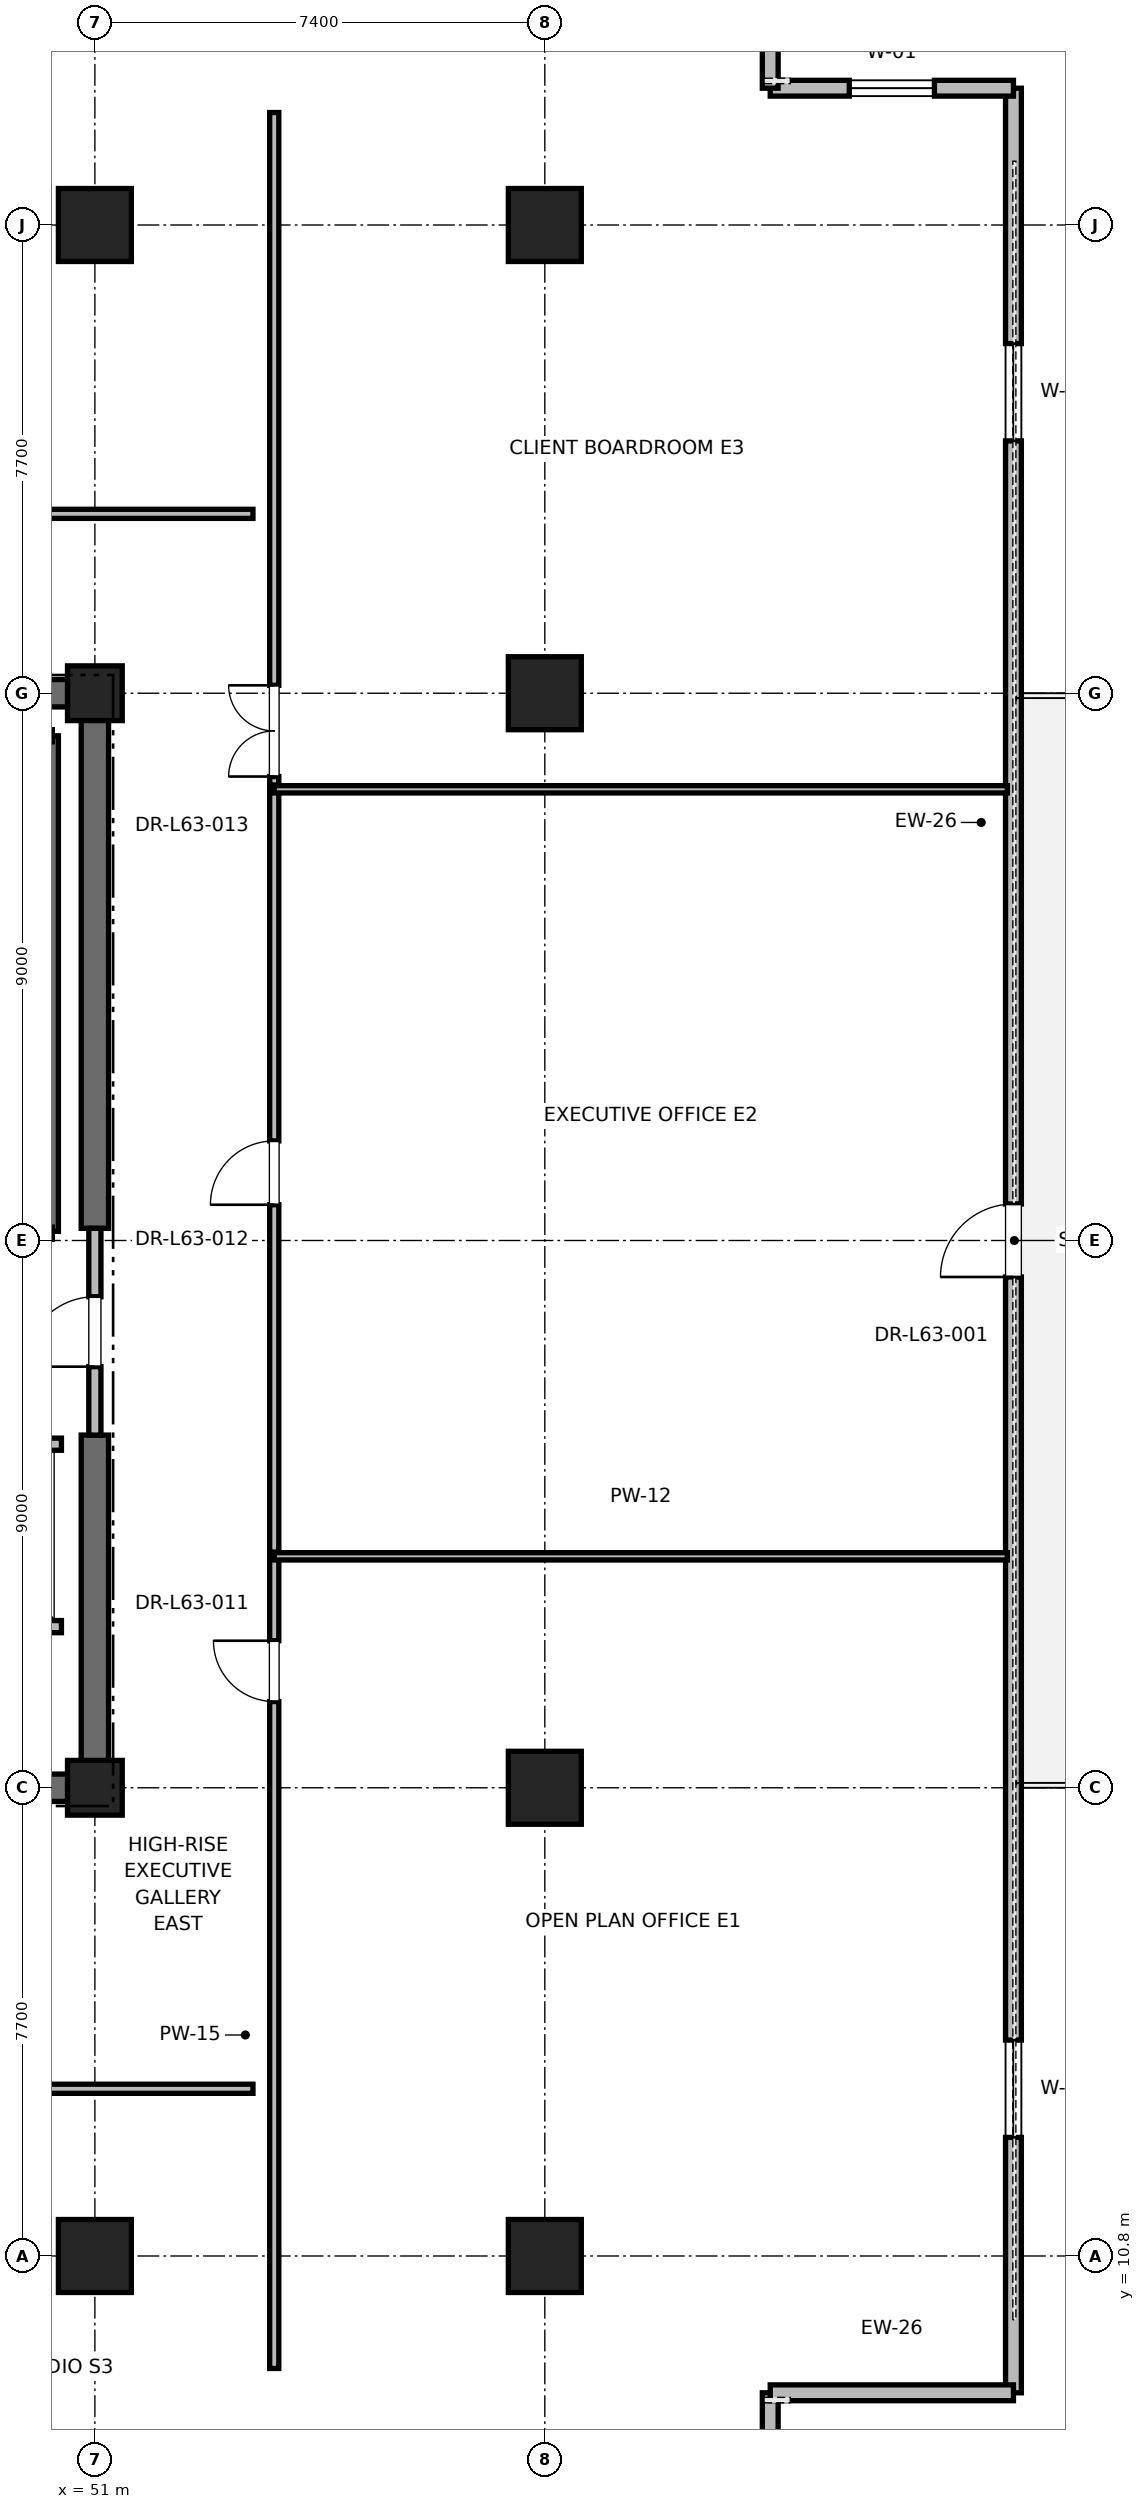
"""IFC4 building model, lengths in metres.
Left out: names, types, materials, properties, quantities, classifications, styles, units other than length and angle.
Written with IfcOpenShell. Run it as: python <this file> out.ifc"""

import sys

from ifc_helpers import new_model, si_unit, direction, frame, frame_2d, origin, origin_2d, place, context, subcontext, project, spatial, rectangle, extrude, element, fill, save


model = new_model("IFC4")
c1 = context("Model", 3, precision=1e-05, world=origin(), true_north=direction((0.0, 1.0)))
c2 = subcontext(c1, "Body", "Model", "MODEL_VIEW")
j1 = project(units=[si_unit("LENGTHUNIT", "METRE"), si_unit("PLANEANGLEUNIT", "RADIAN")], contexts=[c1])
p1 = place(None, origin())
s1 = spatial("IfcSite", under=j1, at=p1, CompositionType="ELEMENT")
p2 = place(p1, origin())
s2 = spatial("IfcBuilding", under=s1, at=p2, CompositionType="ELEMENT")
p3 = place(p2, frame((0.0, 0.0, 271.2)))
s3 = spatial("IfcBuildingStorey", under=s2, at=p3, CompositionType="ELEMENT", Elevation=271.2)
for number, where, z_axis, x_axis in (
    (1, (51.0, 10.8, 0.0), (0.0, 0.0, 1.0), (1.0, 0.0, 0.0)),
    (2, (51.0, 44.2, 0.0), (0.0, 0.0, 1.0), (1.0, 0.0, 0.0)),
    (3, (58.4, 18.5, 0.0), (0.0, 0.0, 1.0), (1.0, 0.0, 0.0)),
    (4, (58.4, 36.5, 0.0), (0.0, 0.0, 1.0), (1.0, 0.0, 0.0)),
    (5, (58.4, 10.8, 0.0), (0.0, 0.0, 1.0), (1.0, 0.0, 0.0)),
    (6, (58.4, 44.2, 0.0), (0.0, 0.0, 1.0), (1.0, 0.0, 0.0)),
):
    element("IfcColumn", number, at=place(p3, frame(where, z_axis=z_axis, x_axis=x_axis)), inside=s3, PredefinedType="COLUMN", context=c2, shape_type="SweptSolid", body=[
        extrude(rectangle(XDim=1.2, YDim=1.2, at=origin_2d()), origin(), (0.0, 0.0, 1.0), 4.0),
    ])
for number, where, z_axis, x_axis in (
    (7, (51.0, 18.5, 0.0), (0.0, 0.0, 1.0), (1.0, 0.0, 0.0)),
    (8, (51.0, 36.5, 0.0), (0.0, 0.0, 1.0), (1.0, 0.0, 0.0)),
):
    element("IfcColumn", number, at=place(p3, frame(where, z_axis=z_axis, x_axis=x_axis)), inside=s3, PredefinedType="PILASTER", context=c2, shape_type="SweptSolid", body=[
        extrude(rectangle(XDim=0.9, YDim=0.9, at=origin_2d()), origin(), (0.0, 0.0, 1.0), 4.0),
    ])
p4 = place(p3, frame((41.8, 18.5, 0.0), z_axis=(0.0, 0.0, 1.0), x_axis=(1.0, 0.0, 0.0)))
e9 = element("IfcWall", 9, at=p4, inside=s3, PredefinedType="SHEAR", context=c2, shape_type="SweptSolid", body=[
    extrude(rectangle(XDim=9.2, YDim=0.45, at=frame_2d((4.6, 0.0))), origin(), (0.0, 0.0, 1.0), 3.785),
])
for number, where, z_axis, x_axis in (
    (10, (45.2, 36.5, 0.0), (0.0, 0.0, 1.0), (1.0, 0.0, 0.0)),
    (11, (51.0, 18.5, 0.0), (0.0, 0.0, 1.0), (0.0, 1.0, 0.0)),
):
    element("IfcWall", number, at=place(p3, frame(where, z_axis=z_axis, x_axis=x_axis)), inside=s3, PredefinedType="SHEAR", context=c2, shape_type="SweptSolid", body=[
        extrude(rectangle(XDim=5.8, YDim=0.45, at=frame_2d((2.9, 0.0))), origin(), (0.0, 0.0, 1.0), 3.785),
    ])
p5 = place(p3, frame((51.0, 27.7, 0.0), z_axis=(0.0, 0.0, 1.0), x_axis=(0.0, 1.0, 0.0)))
e12 = element("IfcWall", 12, at=p5, inside=s3, PredefinedType="SHEAR", context=c2, shape_type="SweptSolid", body=[
    extrude(rectangle(XDim=8.8, YDim=0.45, at=frame_2d((4.4, 0.0))), origin(), (0.0, 0.0, 1.0), 3.785),
])
p6 = place(p3, frame((66.107, 8.55, 0.0), z_axis=(0.0, 0.0, 1.0), x_axis=(0.0, 1.0, 0.0)))
e13 = element("IfcWall", 13, at=p6, inside=s3, PredefinedType="PARAPET", context=c2, shape_type="SweptSolid", body=[
    extrude(rectangle(XDim=37.899, YDim=0.26, at=frame_2d((18.95, 0.0))), origin(), (0.0, 0.0, 1.0), 3.123),
])
p7 = place(p6, frame((4.2, 0.0, 0.85)))
e14 = element("IfcOpeningElement", 14, at=p7, cuts=e13, PredefinedType="OPENING", context=c2, shape_type="SweptSolid", body=[
    extrude(rectangle(XDim=1.6, YDim=2.1, at=frame_2d((0.8, 1.05))), frame((0.0, 0.13, 0.0), z_axis=(0.0, -1.0, 0.0), x_axis=(1.0, 0.0, 0.0)), (0.0, 0.0, 1.0), 0.26),
])
p8 = place(p6, frame((18.35, 0.0, 0.0)))
e15 = element("IfcOpeningElement", 15, at=p8, cuts=e13, PredefinedType="OPENING", context=c2, shape_type="SweptSolid", body=[
    extrude(rectangle(XDim=1.2, YDim=2.2, at=frame_2d((0.6, 1.1))), frame((0.0, 0.13, 0.0), z_axis=(0.0, -1.0, 0.0), x_axis=(1.0, 0.0, 0.0)), (0.0, 0.0, 1.0), 0.26),
])
p9 = place(p6, frame((32.099, 0.0, 0.85)))
e16 = element("IfcOpeningElement", 16, at=p9, cuts=e13, PredefinedType="OPENING", context=c2, shape_type="SweptSolid", body=[
    extrude(rectangle(XDim=1.6, YDim=2.1, at=frame_2d((0.8, 1.05))), frame((0.0, 0.13, 0.0), z_axis=(0.0, -1.0, 0.0), x_axis=(1.0, 0.0, 0.0)), (0.0, 0.0, 1.0), 0.26),
])
p10 = place(p3, frame((62.107, 5.05, 0.0), z_axis=(0.0, 0.0, 1.0), x_axis=(0.0, 1.0, 0.0)))
e17 = element("IfcWall", 17, at=p10, inside=s3, PredefinedType="PARAPET", context=c2, shape_type="SweptSolid", body=[
    extrude(rectangle(XDim=3.5, YDim=0.26, at=frame_2d((1.75, 0.0))), origin(), (0.0, 0.0, 1.0), 3.785),
])
p11 = place(p10, frame((1.05, 0.0, 0.85)))
e18 = element("IfcOpeningElement", 18, at=p11, cuts=e17, PredefinedType="OPENING", context=c2, shape_type="SweptSolid", body=[
    extrude(rectangle(XDim=1.4, YDim=2.0, at=frame_2d((0.7, 1.0))), frame((0.0, 0.13, 0.0), z_axis=(0.0, -1.0, 0.0), x_axis=(1.0, 0.0, 0.0)), (0.0, 0.0, 1.0), 0.26),
])
p12 = place(p3, frame((62.107, 8.55, 0.0), z_axis=(0.0, 0.0, 1.0), x_axis=(1.0, 0.0, 0.0)))
e19 = element("IfcWall", 19, at=p12, inside=s3, PredefinedType="PARAPET", context=c2, shape_type="SweptSolid", body=[
    extrude(rectangle(XDim=4.0, YDim=0.26, at=frame_2d((2.0, 0.0))), origin(), (0.0, 0.0, 1.0), 3.785),
])
p13 = place(p3, frame((66.107, 46.45, 0.0), z_axis=(0.0, 0.0, 1.0), x_axis=(-1.0, 0.0, 0.0)))
e20 = element("IfcWall", 20, at=p13, inside=s3, PredefinedType="PARAPET", context=c2, shape_type="SweptSolid", body=[
    extrude(rectangle(XDim=4.0, YDim=0.26, at=frame_2d((2.0, 0.0))), origin(), (0.0, 0.0, 1.0), 3.785),
])
p14 = place(p13, frame((1.3, 0.0, 0.85)))
e21 = element("IfcOpeningElement", 21, at=p14, cuts=e20, PredefinedType="OPENING", context=c2, shape_type="SweptSolid", body=[
    extrude(rectangle(XDim=1.4, YDim=2.0, at=frame_2d((0.7, 1.0))), frame((0.0, 0.13, 0.0), z_axis=(0.0, -1.0, 0.0), x_axis=(1.0, 0.0, 0.0)), (0.0, 0.0, 1.0), 0.26),
])
p15 = place(p3, frame((62.107, 46.45, 0.0), z_axis=(0.0, 0.0, 1.0), x_axis=(0.0, 1.0, 0.0)))
e22 = element("IfcWall", 22, at=p15, inside=s3, PredefinedType="PARAPET", context=c2, shape_type="SweptSolid", body=[
    extrude(rectangle(XDim=3.5, YDim=0.26, at=frame_2d((1.75, 0.0))), origin(), (0.0, 0.0, 1.0), 3.785),
])
p16 = place(p3, frame((50.3, 27.65, 0.0), z_axis=(0.0, 0.0, 1.0), x_axis=(0.0, 1.0, 0.0)))
e23 = element("IfcWall", 23, at=p16, inside=s3, PredefinedType="SOLIDWALL", context=c2, shape_type="SweptSolid", body=[
    extrude(rectangle(XDim=8.15, YDim=0.2, at=frame_2d((4.075, 0.0))), origin(), (0.0, 0.0, 1.0), 3.785),
])
p17 = place(p3, frame((51.0, 24.3, 0.0), z_axis=(0.0, 0.0, 1.0), x_axis=(0.0, 1.0, 0.0)))
e24 = element("IfcWall", 24, at=p17, inside=s3, PredefinedType="PARTITIONING", context=c2, shape_type="SweptSolid", body=[
    extrude(rectangle(XDim=3.4, YDim=0.2, at=frame_2d((1.7, 0.0))), origin(), (0.0, 0.0, 1.0), 2.865),
])
p18 = place(p17, frame((1.125, 0.0, 0.0)))
e25 = element("IfcOpeningElement", 25, at=p18, cuts=e24, PredefinedType="OPENING", context=c2, shape_type="SweptSolid", body=[
    extrude(rectangle(XDim=1.15, YDim=2.2, at=frame_2d((0.575, 1.1))), frame((0.0, 0.1, 0.0), z_axis=(0.0, -1.0, 0.0), x_axis=(1.0, 0.0, 0.0)), (0.0, 0.0, 1.0), 0.2),
])
p19 = place(p3, frame((47.85, 21.15, 0.0), z_axis=(0.0, 0.0, 1.0), x_axis=(1.0, 0.0, 0.0)))
e26 = element("IfcWall", 26, at=p19, inside=s3, PredefinedType="SOLIDWALL", context=c2, shape_type="SweptSolid", body=[
    extrude(rectangle(XDim=2.6, YDim=0.2, at=frame_2d((1.3, 0.0))), origin(), (0.0, 0.0, 1.0), 3.785),
])
p20 = place(p3, frame((50.45, 24.15, 0.0), z_axis=(0.0, 0.0, 1.0), x_axis=(-1.0, 0.0, 0.0)))
e27 = element("IfcWall", 27, at=p20, inside=s3, PredefinedType="SOLIDWALL", context=c2, shape_type="SweptSolid", body=[
    extrude(rectangle(XDim=2.6, YDim=0.2, at=frame_2d((1.3, 0.0))), origin(), (0.0, 0.0, 1.0), 2.865),
])
p21 = place(p20, frame((0.75, 0.0, 0.0)))
e28 = element("IfcOpeningElement", 28, at=p21, cuts=e27, PredefinedType="OPENING", context=c2, shape_type="SweptSolid", body=[
    extrude(rectangle(XDim=1.1, YDim=2.2, at=frame_2d((0.55, 1.1))), frame((0.0, 0.1, 0.0), z_axis=(0.0, -1.0, 0.0), x_axis=(1.0, 0.0, 0.0)), (0.0, 0.0, 1.0), 0.2),
])
p22 = place(p3, frame((37.894, 39.45, 0.0), z_axis=(0.0, 0.0, 1.0), x_axis=(1.0, 0.0, 0.0)))
e29 = element("IfcWall", 29, at=p22, inside=s3, PredefinedType="PARTITIONING", context=c2, shape_type="SweptSolid", body=[
    extrude(rectangle(XDim=15.706, YDim=0.15, at=frame_2d((7.853, 0.0))), origin(), (0.0, 0.0, 1.0), 2.85),
])
p23 = place(p22, frame((7.278, 0.0, 0.0)))
e30 = element("IfcOpeningElement", 30, at=p23, cuts=e29, PredefinedType="OPENING", context=c2, shape_type="SweptSolid", body=[
    extrude(rectangle(XDim=1.05, YDim=2.2, at=frame_2d((0.525, 1.1))), frame((0.0, 0.075, 0.0), z_axis=(0.0, -1.0, 0.0), x_axis=(1.0, 0.0, 0.0)), (0.0, 0.0, 1.0), 0.15),
])
p24 = place(p3, frame((44.15, 13.55, 0.0), z_axis=(0.0, 0.0, 1.0), x_axis=(1.0, 0.0, 0.0)))
e31 = element("IfcWall", 31, at=p24, inside=s3, PredefinedType="PARTITIONING", context=c2, shape_type="SweptSolid", body=[
    extrude(rectangle(XDim=9.45, YDim=0.15, at=frame_2d((4.725, 0.0))), origin(), (0.0, 0.0, 1.0), 2.85),
])
p25 = place(p24, frame((4.175, 0.0, 0.0)))
e32 = element("IfcOpeningElement", 32, at=p25, cuts=e31, PredefinedType="OPENING", context=c2, shape_type="SweptSolid", body=[
    extrude(rectangle(XDim=1.0, YDim=2.15, at=frame_2d((0.5, 1.075))), frame((0.0, 0.075, 0.0), z_axis=(0.0, -1.0, 0.0), x_axis=(1.0, 0.0, 0.0)), (0.0, 0.0, 1.0), 0.15),
])
p26 = place(p3, frame((53.95, 8.95, 0.0), z_axis=(0.0, 0.0, 1.0), x_axis=(0.0, 1.0, 0.0)))
e33 = element("IfcWall", 33, at=p26, inside=s3, PredefinedType="PARTITIONING", context=c2, shape_type="SweptSolid", body=[
    extrude(rectangle(XDim=13.356, YDim=0.15, at=frame_2d((6.678, 0.0))), origin(), (0.0, 0.0, 1.0), 2.85),
])
p27 = place(p26, frame((10.968, 0.0, 0.0)))
e34 = element("IfcOpeningElement", 34, at=p27, cuts=e33, PredefinedType="OPENING", context=c2, shape_type="SweptSolid", body=[
    extrude(rectangle(XDim=1.0, YDim=2.15, at=frame_2d((0.5, 1.075))), frame((0.0, 0.075, 0.0), z_axis=(0.0, -1.0, 0.0), x_axis=(1.0, 0.0, 0.0)), (0.0, 0.0, 1.0), 0.15),
])
p28 = place(p3, frame((53.95, 22.306, 0.0), z_axis=(0.0, 0.0, 1.0), x_axis=(1.0, 0.0, 0.0)))
e35 = element("IfcWall", 35, at=p28, inside=s3, PredefinedType="PARTITIONING", context=c2, shape_type="SweptSolid", body=[
    extrude(rectangle(XDim=12.057, YDim=0.12, at=frame_2d((6.029, 0.0))), origin(), (0.0, 0.0, 1.0), 2.85),
])
p29 = place(p3, frame((53.95, 22.376, 0.0), z_axis=(0.0, 0.0, 1.0), x_axis=(0.0, 1.0, 0.0)))
e36 = element("IfcWall", 36, at=p29, inside=s3, PredefinedType="PARTITIONING", context=c2, shape_type="SweptSolid", body=[
    extrude(rectangle(XDim=12.544, YDim=0.15, at=frame_2d((6.272, 0.0))), origin(), (0.0, 0.0, 1.0), 2.85),
])
p30 = place(p29, frame((5.712, 0.0, 0.0)))
e37 = element("IfcOpeningElement", 37, at=p30, cuts=e36, PredefinedType="OPENING", context=c2, shape_type="SweptSolid", body=[
    extrude(rectangle(XDim=1.05, YDim=2.2, at=frame_2d((0.525, 1.1))), frame((0.0, 0.075, 0.0), z_axis=(0.0, -1.0, 0.0), x_axis=(1.0, 0.0, 0.0)), (0.0, 0.0, 1.0), 0.15),
])
p31 = place(p3, frame((53.95, 34.92, 0.0), z_axis=(0.0, 0.0, 1.0), x_axis=(1.0, 0.0, 0.0)))
e38 = element("IfcWall", 38, at=p31, inside=s3, PredefinedType="PARTITIONING", context=c2, shape_type="SweptSolid", body=[
    extrude(rectangle(XDim=12.057, YDim=0.12, at=frame_2d((6.029, 0.0))), origin(), (0.0, 0.0, 1.0), 2.85),
])
p32 = place(p3, frame((53.95, 34.99, 0.0), z_axis=(0.0, 0.0, 1.0), x_axis=(0.0, 1.0, 0.0)))
e39 = element("IfcWall", 39, at=p32, inside=s3, PredefinedType="PARTITIONING", context=c2, shape_type="SweptSolid", body=[
    extrude(rectangle(XDim=11.06, YDim=0.15, at=frame_2d((5.53, 0.0))), origin(), (0.0, 0.0, 1.0), 2.85),
])
p33 = place(p32, frame((0.14, 0.0, 0.0)))
e40 = element("IfcOpeningElement", 40, at=p33, cuts=e39, PredefinedType="OPENING", context=c2, shape_type="SweptSolid", body=[
    extrude(rectangle(XDim=1.5, YDim=2.25, at=frame_2d((0.75, 1.125))), frame((0.0, 0.075, 0.0), z_axis=(0.0, -1.0, 0.0), x_axis=(1.0, 0.0, 0.0)), (0.0, 0.0, 1.0), 0.15),
])
p34 = place(p7, origin())
e41 = element("IfcWindow", 41, at=p34, inside=s3, PartitioningType="SINGLE_PANEL", PredefinedType="WINDOW", context=c2, shape_type="SweptSolid", body=[
    extrude(rectangle(XDim=1.6, YDim=2.1, at=frame_2d((0.8, 1.05))), frame((0.0, 0.03, 0.0), z_axis=(0.0, -1.0, 0.0), x_axis=(1.0, 0.0, 0.0)), (0.0, 0.0, 1.0), 0.06),
])
fill(e14, e41)
p35 = place(p8, origin())
e42 = element("IfcDoor", 42, at=p35, inside=s3, OperationType="SINGLE_SWING_LEFT", PredefinedType="DOOR", context=c2, shape_type="SweptSolid", body=[
    extrude(rectangle(XDim=1.2, YDim=2.2, at=frame_2d((0.6, 1.1))), frame((0.0, 0.025, 0.0), z_axis=(0.0, -1.0, 0.0), x_axis=(1.0, 0.0, 0.0)), (0.0, 0.0, 1.0), 0.05),
])
fill(e15, e42)
p36 = place(p9, origin())
e43 = element("IfcWindow", 43, at=p36, inside=s3, PartitioningType="SINGLE_PANEL", PredefinedType="WINDOW", context=c2, shape_type="SweptSolid", body=[
    extrude(rectangle(XDim=1.6, YDim=2.1, at=frame_2d((0.8, 1.05))), frame((0.0, 0.03, 0.0), z_axis=(0.0, -1.0, 0.0), x_axis=(1.0, 0.0, 0.0)), (0.0, 0.0, 1.0), 0.06),
])
fill(e16, e43)
p37 = place(p14, origin())
e44 = element("IfcWindow", 44, at=p37, inside=s3, PartitioningType="SINGLE_PANEL", PredefinedType="WINDOW", context=c2, shape_type="SweptSolid", body=[
    extrude(rectangle(XDim=1.4, YDim=2.0, at=frame_2d((0.7, 1.0))), frame((0.0, 0.03, 0.0), z_axis=(0.0, -1.0, 0.0), x_axis=(1.0, 0.0, 0.0)), (0.0, 0.0, 1.0), 0.06),
])
fill(e21, e44)
p38 = place(p18, origin())
e45 = element("IfcDoor", 45, at=p38, inside=s3, OperationType="SINGLE_SWING_LEFT", PredefinedType="DOOR", context=c2, shape_type="SweptSolid", body=[
    extrude(rectangle(XDim=1.15, YDim=2.2, at=frame_2d((0.575, 1.1))), frame((0.0, 0.025, 0.0), z_axis=(0.0, -1.0, 0.0), x_axis=(1.0, 0.0, 0.0)), (0.0, 0.0, 1.0), 0.05),
])
fill(e25, e45)
p39 = place(p27, origin())
e46 = element("IfcDoor", 46, at=p39, inside=s3, OperationType="SINGLE_SWING_RIGHT", PredefinedType="DOOR", context=c2, shape_type="SweptSolid", body=[
    extrude(rectangle(XDim=1.0, YDim=2.15, at=frame_2d((0.5, 1.075))), frame((0.0, 0.025, 0.0), z_axis=(0.0, -1.0, 0.0), x_axis=(1.0, 0.0, 0.0)), (0.0, 0.0, 1.0), 0.05),
])
fill(e34, e46)
p40 = place(p30, origin())
e47 = element("IfcDoor", 47, at=p40, inside=s3, OperationType="SINGLE_SWING_LEFT", PredefinedType="DOOR", context=c2, shape_type="SweptSolid", body=[
    extrude(rectangle(XDim=1.05, YDim=2.2, at=frame_2d((0.525, 1.1))), frame((0.0, 0.025, 0.0), z_axis=(0.0, -1.0, 0.0), x_axis=(1.0, 0.0, 0.0)), (0.0, 0.0, 1.0), 0.05),
])
fill(e37, e47)
p41 = place(p33, origin())
e48 = element("IfcDoor", 48, at=p41, inside=s3, OperationType="DOUBLE_DOOR_SINGLE_SWING", PredefinedType="DOOR", context=c2, shape_type="SweptSolid", body=[
    extrude(rectangle(XDim=1.5, YDim=2.25, at=frame_2d((0.75, 1.125))), frame((0.0, 0.025, 0.0), z_axis=(0.0, -1.0, 0.0), x_axis=(1.0, 0.0, 0.0)), (0.0, 0.0, 1.0), 0.05),
])
fill(e40, e48)
save(model, sys.argv[1])
